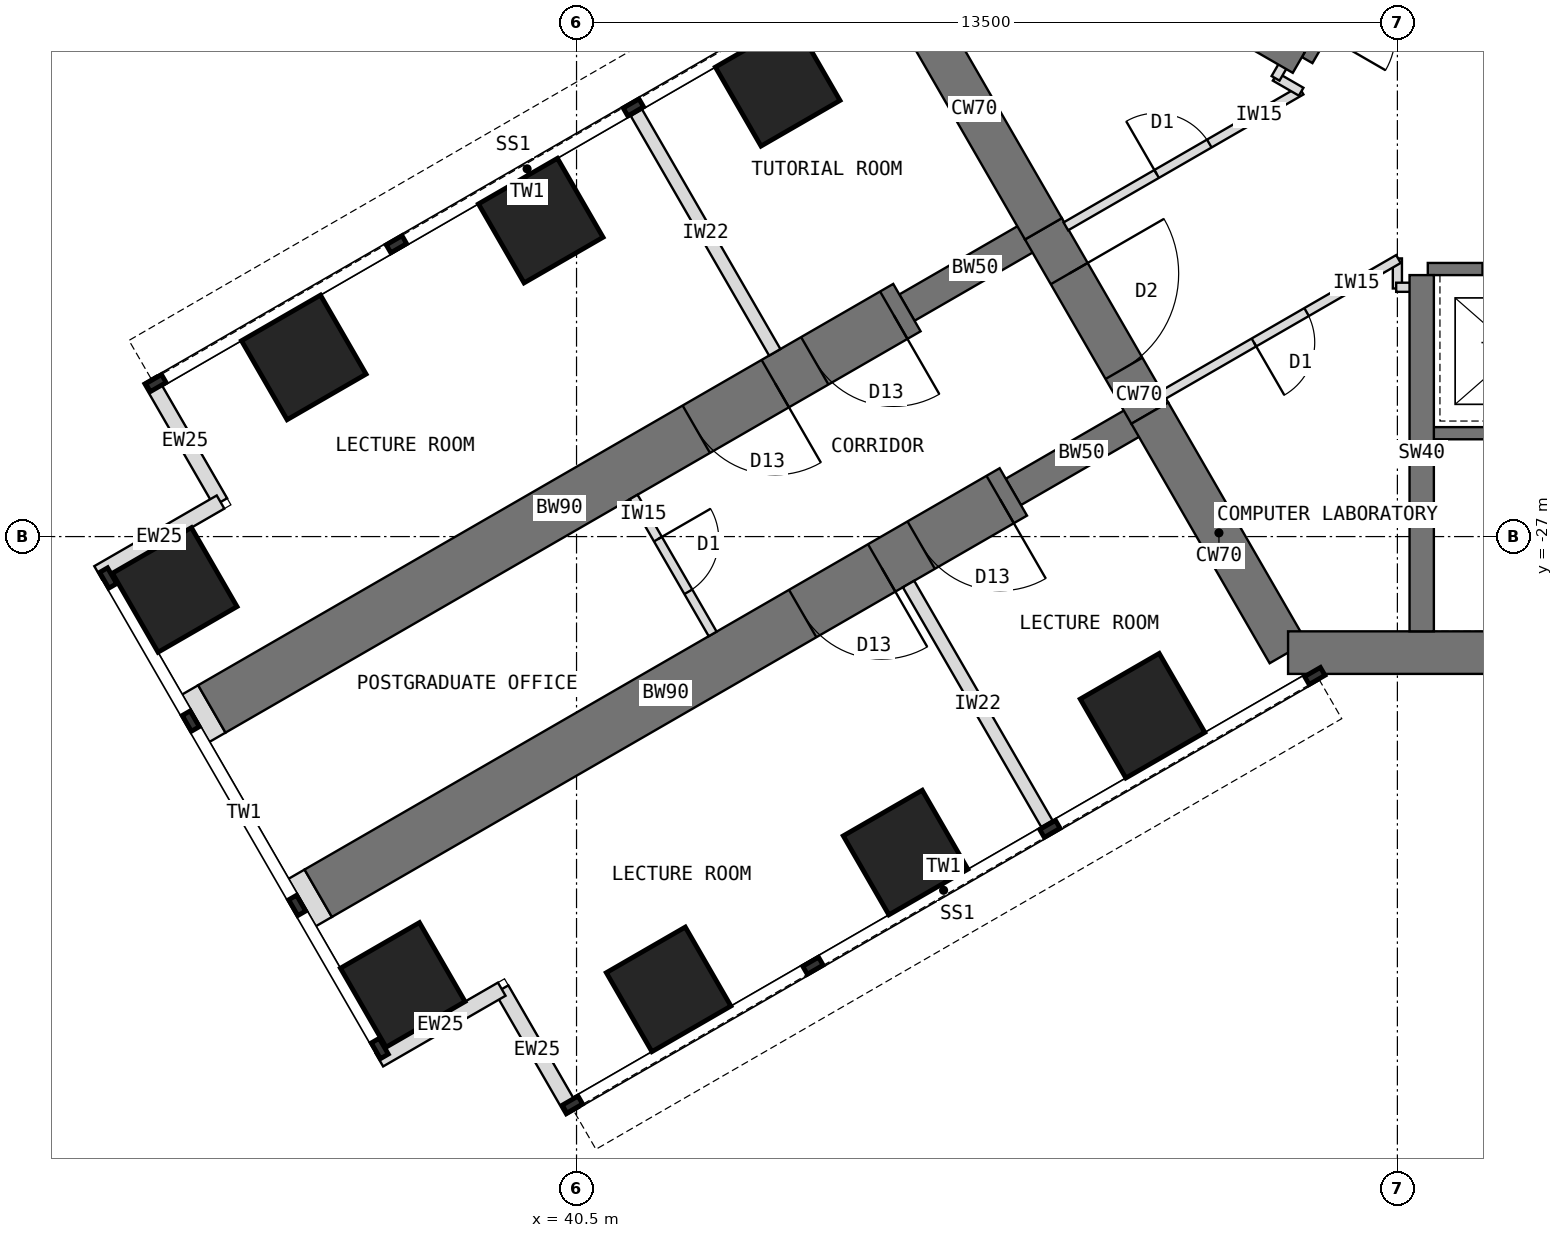
"""IFC4 building model, lengths in metres.
Left out: names, types, materials, properties, quantities, classifications, styles, units other than length and angle.
Written with IfcOpenShell. Run it as: python <this file> out.ifc"""

import sys

from ifc_helpers import new_model, si_unit, direction, frame, frame_2d, origin, origin_2d, place, context, subcontext, project, spatial, rectangle, extrude, element, fill, save


model = new_model("IFC4")
c1 = context("Model", 3, precision=1e-05, world=origin(), true_north=direction((0.0, 1.0)))
c2 = subcontext(c1, "Body", "Model", "MODEL_VIEW")
j1 = project(units=[si_unit("LENGTHUNIT", "METRE"), si_unit("PLANEANGLEUNIT", "RADIAN")], contexts=[c1])
p1 = place(None, origin())
s1 = spatial("IfcSite", under=j1, at=p1, CompositionType="ELEMENT")
p2 = place(p1, origin())
s2 = spatial("IfcBuilding", under=s1, at=p2, CompositionType="ELEMENT")
p3 = place(p2, frame((0.0, 0.0, 24.5)))
s3 = spatial("IfcBuildingStorey", under=s2, at=p3, CompositionType="ELEMENT", Elevation=24.5)
p4 = place(p3, frame((45.904, -18.0, 0.0), z_axis=(0.0, 0.0, 1.0), x_axis=(0.500024481964, -0.866011268655, 0.0)))
e1 = element("IfcWall", 1, at=p4, inside=s3, PredefinedType="SHEAR", context=c2, shape_type="SweptSolid", body=[
    extrude(rectangle(XDim=4.548, YDim=0.7, at=frame_2d((2.274, 0.0))), origin(), (0.0, 0.0, 1.0), 4.0),
])
p5 = place(p3, frame((48.178, -21.939, 0.0), z_axis=(0.0, 0.0, 1.0), x_axis=(0.500010275428, -0.866019471182, 0.0)))
e2 = element("IfcWall", 2, at=p5, inside=s3, PredefinedType="SHEAR", context=c2, shape_type="SweptSolid", body=[
    extrude(rectangle(XDim=3.5, YDim=0.7, at=frame_2d((1.75, 0.0))), origin(), (0.0, 0.0, 1.0), 4.0),
])
p6 = place(p5, frame((0.85, 0.0, 0.0)))
e3 = element("IfcOpeningElement", 3, at=p6, cuts=e2, PredefinedType="OPENING", context=c2, shape_type="SweptSolid", body=[
    extrude(rectangle(XDim=1.8, YDim=2.1, at=frame_2d((0.9, 1.05))), frame((0.0, 0.36, 0.0), z_axis=(0.0, -1.0, 0.0), x_axis=(1.0, 0.0, 0.0)), (0.0, 0.0, 1.0), 0.72),
])
p7 = place(p3, frame((49.928, -24.97, 0.0), z_axis=(0.0, 0.0, 1.0), x_axis=(0.499984222037, -0.866034513004, 0.0)))
e4 = element("IfcWall", 4, at=p7, inside=s3, PredefinedType="SHEAR", context=c2, shape_type="SweptSolid", body=[
    extrude(rectangle(XDim=4.548, YDim=0.7, at=frame_2d((2.274, 0.0))), origin(), (0.0, 0.0, 1.0), 4.0),
])
p8 = place(p3, frame((52.202, -28.908, 0.0), z_axis=(0.0, 0.0, 1.0), x_axis=(1.0, 0.0, 0.0)))
e5 = element("IfcWall", 5, at=p8, inside=s3, PredefinedType="SHEAR", context=c2, shape_type="SweptSolid", body=[
    extrude(rectangle(XDim=12.596, YDim=0.7, at=frame_2d((6.298, 0.0))), origin(), (0.0, 0.0, 1.0), 4.0),
])
p9 = place(p3, frame((49.928, -24.97, 0.0), z_axis=(0.0, 0.0, 1.0), x_axis=(-0.866031863473, -0.499988811324, 0.0)))
e6 = element("IfcWall", 6, at=p9, inside=s3, PredefinedType="SHEAR", context=c2, shape_type="SweptSolid", body=[
    extrude(rectangle(XDim=2.592, YDim=0.5, at=frame_2d((1.296, 0.0))), origin(), (0.0, 0.0, 1.0), 4.0),
])
p10 = place(p3, frame((47.684, -26.266, 0.0), z_axis=(0.0, 0.0, 1.0), x_axis=(-0.866027579429, -0.499996231654, 0.0)))
e7 = element("IfcWall", 7, at=p10, inside=s3, PredefinedType="SHEAR", context=c2, shape_type="SweptSolid", body=[
    extrude(rectangle(XDim=13.2, YDim=0.9, at=frame_2d((6.6, 0.0))), origin(), (0.0, 0.0, 1.0), 4.0),
])
p11 = place(p10, frame((0.25, 0.0, 0.0)))
e8 = element("IfcOpeningElement", 8, at=p11, cuts=e7, PredefinedType="OPENING", context=c2, shape_type="SweptSolid", body=[
    extrude(rectangle(XDim=1.5, YDim=2.1, at=frame_2d((0.75, 1.05))), frame((0.0, 0.46, 0.0), z_axis=(0.0, -1.0, 0.0), x_axis=(1.0, 0.0, 0.0)), (0.0, 0.0, 1.0), 0.92),
])
p12 = place(p10, frame((2.5, 0.0, 0.0)))
e9 = element("IfcOpeningElement", 9, at=p12, cuts=e7, PredefinedType="OPENING", context=c2, shape_type="SweptSolid", body=[
    extrude(rectangle(XDim=1.5, YDim=2.1, at=frame_2d((0.75, 1.05))), frame((0.0, 0.46, 0.0), z_axis=(0.0, -1.0, 0.0), x_axis=(1.0, 0.0, 0.0)), (0.0, 0.0, 1.0), 0.92),
])
p13 = place(p3, frame((48.178, -21.939, 0.0), z_axis=(0.0, 0.0, 1.0), x_axis=(-0.866072649678, -0.499918158782, 0.0)))
e10 = element("IfcWall", 10, at=p13, inside=s3, PredefinedType="SHEAR", context=c2, shape_type="SweptSolid", body=[
    extrude(rectangle(XDim=2.592, YDim=0.5, at=frame_2d((1.296, 0.0))), origin(), (0.0, 0.0, 1.0), 4.0),
])
p14 = place(p3, frame((45.934, -23.234, 0.0), z_axis=(0.0, 0.0, 1.0), x_axis=(-0.866019570528, -0.500010103361, 0.0)))
e11 = element("IfcWall", 11, at=p14, inside=s3, PredefinedType="SHEAR", context=c2, shape_type="SweptSolid", body=[
    extrude(rectangle(XDim=13.2, YDim=0.9, at=frame_2d((6.6, 0.0))), origin(), (0.0, 0.0, 1.0), 4.0),
])
p15 = place(p14, frame((0.25, 0.0, 0.0)))
e12 = element("IfcOpeningElement", 12, at=p15, cuts=e11, PredefinedType="OPENING", context=c2, shape_type="SweptSolid", body=[
    extrude(rectangle(XDim=1.5, YDim=2.1, at=frame_2d((0.75, 1.05))), frame((0.0, 0.46, 0.0), z_axis=(0.0, -1.0, 0.0), x_axis=(1.0, 0.0, 0.0)), (0.0, 0.0, 1.0), 0.92),
])
p16 = place(p14, frame((2.5, 0.0, 0.0)))
e13 = element("IfcOpeningElement", 13, at=p16, cuts=e11, PredefinedType="OPENING", context=c2, shape_type="SweptSolid", body=[
    extrude(rectangle(XDim=1.5, YDim=2.1, at=frame_2d((0.75, 1.05))), frame((0.0, 0.46, 0.0), z_axis=(0.0, -1.0, 0.0), x_axis=(1.0, 0.0, 0.0)), (0.0, 0.0, 1.0), 0.92),
])
for number, where, z_axis, x_axis in (
    (14, (49.809, -29.946, 0.0), (0.0, 0.0, 1.0), (0.866, 0.5, 0.0)),
    (15, (43.809, -19.554, 0.0), (0.0, 0.0, 1.0), (0.866, 0.5, 0.0)),
    (16, (45.912, -32.196, 0.0), (0.0, 0.0, 1.0), (0.866, 0.5, 0.0)),
    (17, (39.912, -21.804, 0.0), (0.0, 0.0, 1.0), (0.866, 0.5, 0.0)),
    (18, (42.014, -34.446, 0.0), (0.0, 0.0, 1.0), (0.866, 0.5, 0.0)),
    (19, (36.014, -24.054, 0.0), (0.0, 0.0, 1.0), (0.866, 0.5, 0.0)),
    (20, (37.642, -34.373, 0.0), (0.0, 0.0, 1.0), (0.866, 0.5, 0.0)),
    (21, (33.892, -27.877, 0.0), (0.0, 0.0, 1.0), (0.866, 0.5, 0.0)),
):
    element("IfcColumn", number, at=place(p3, frame(where, z_axis=z_axis, x_axis=x_axis)), inside=s3, PredefinedType="COLUMN", context=c2, shape_type="SweptSolid", body=[
        extrude(rectangle(XDim=1.5, YDim=1.5, at=origin_2d()), origin(), (0.0, 0.0, 1.0), 4.0),
    ])
for number, where, z_axis, x_axis in (
    (22, (40.433, -36.456, 0.0), (0.0, 0.0, 1.0), (-0.5, 0.866, 0.0)),
    (23, (39.27, -34.443, 0.0), (0.0, 0.0, 1.0), (-0.866, -0.5, 0.0)),
    (24, (33.483, -24.419, 0.0), (0.0, 0.0, 1.0), (0.5, -0.866, 0.0)),
    (25, (34.645, -26.432, 0.0), (0.0, 0.0, 1.0), (-0.866, -0.5, 0.0)),
):
    element("IfcWall", number, at=place(p3, frame(where, z_axis=z_axis, x_axis=x_axis)), inside=s3, PredefinedType="STANDARD", context=c2, shape_type="SweptSolid", body=[
        extrude(rectangle(XDim=2.325, YDim=0.25, at=frame_2d((1.163, 0.0))), origin(), (0.0, 0.0, 1.0), 3.8),
    ])
for number, where, z_axis, x_axis in (
    (26, (36.252, -32.865, 0.0), (0.0, 0.0, 1.0), (-0.866, -0.5, 0.0)),
    (27, (34.502, -29.834, 0.0), (0.0, 0.0, 1.0), (-0.866, -0.5, 0.0)),
):
    element("IfcWall", number, at=place(p3, frame(where, z_axis=z_axis, x_axis=x_axis)), inside=s3, PredefinedType="PARTITIONING", context=c2, shape_type="SweptSolid", body=[
        extrude(rectangle(XDim=0.31, YDim=0.9, at=frame_2d((0.155, 0.0))), origin(), (0.0, 0.0, 1.0), 3.8),
    ])
p17 = place(p3, frame((56.516, -12.236, 0.0), z_axis=(0.0, 0.0, 1.0), x_axis=(-0.49999894854, -0.866026010844, 0.0)))
e28 = element("IfcWall", 28, at=p17, inside=s3, PredefinedType="SHEAR", context=c2, shape_type="SweptSolid", body=[
    extrude(rectangle(XDim=8.0, YDim=0.2, at=frame_2d((4.0, 0.0))), origin(), (0.0, 0.0, 1.0), 4.0),
])
p18 = place(p17, frame((6.3, 0.0, 0.0)))
e29 = element("IfcOpeningElement", 29, at=p18, cuts=e28, PredefinedType="OPENING", context=c2, shape_type="SweptSolid", body=[
    extrude(rectangle(XDim=1.2, YDim=2.1, at=frame_2d((0.6, 1.05))), frame((0.0, 0.11, 0.0), z_axis=(0.0, -1.0, 0.0), x_axis=(1.0, 0.0, 0.0)), (0.0, 0.0, 1.0), 0.22),
])
p19 = place(p3, frame((52.38, -19.201, 0.0), z_axis=(0.0, 0.0, 1.0), x_axis=(-0.866023886965, 0.500002627198, 0.0)))
e30 = element("IfcWall", 30, at=p19, inside=s3, PredefinedType="SHEAR", context=c2, shape_type="SweptSolid", body=[
    extrude(rectangle(XDim=5.858, YDim=0.4, at=frame_2d((2.929, 0.0))), origin(), (0.0, 0.0, 1.0), 4.0),
])
p20 = place(p3, frame((54.5, -22.6, 0.0), z_axis=(0.0, 0.0, 1.0), x_axis=(1.0, 0.0, 0.0)))
e31 = element("IfcWall", 31, at=p20, inside=s3, PredefinedType="SHEAR", context=c2, shape_type="SweptSolid", body=[
    extrude(rectangle(XDim=8.0, YDim=0.2, at=frame_2d((4.0, 0.0))), origin(), (0.0, 0.0, 1.0), 4.0),
])
p21 = place(p20, frame((6.3, 0.0, 0.0)))
e32 = element("IfcOpeningElement", 32, at=p21, cuts=e31, PredefinedType="OPENING", context=c2, shape_type="SweptSolid", body=[
    extrude(rectangle(XDim=1.2, YDim=2.1, at=frame_2d((0.6, 1.05))), frame((0.0, 0.11, 0.0), z_axis=(0.0, -1.0, 0.0), x_axis=(1.0, 0.0, 0.0)), (0.0, 0.0, 1.0), 0.22),
])
p22 = place(p20, frame((0.9, 0.0, 0.0)))
e33 = element("IfcOpeningElement", 33, at=p22, cuts=e31, PredefinedType="OPENING", context=c2, shape_type="SweptSolid", body=[
    extrude(rectangle(XDim=1.1, YDim=2.2, at=frame_2d((0.55, 1.1))), frame((0.0, 0.11, 0.0), z_axis=(0.0, -1.0, 0.0), x_axis=(1.0, 0.0, 0.0)), (0.0, 0.0, 1.0), 0.22),
])
p23 = place(p3, frame((54.5, -25.3, 0.0), z_axis=(0.0, 0.0, 1.0), x_axis=(1.0, 0.0, 0.0)))
e34 = element("IfcWall", 34, at=p23, inside=s3, PredefinedType="SHEAR", context=c2, shape_type="SweptSolid", body=[
    extrude(rectangle(XDim=8.0, YDim=0.2, at=frame_2d((4.0, 0.0))), origin(), (0.0, 0.0, 1.0), 4.0),
])
p24 = place(p23, frame((6.7, 0.0, 0.0)))
e35 = element("IfcOpeningElement", 35, at=p24, cuts=e34, PredefinedType="OPENING", context=c2, shape_type="SweptSolid", body=[
    extrude(rectangle(XDim=1.1, YDim=2.1, at=frame_2d((0.55, 1.05))), frame((0.0, 0.11, 0.0), z_axis=(0.0, -1.0, 0.0), x_axis=(1.0, 0.0, 0.0)), (0.0, 0.0, 1.0), 0.22),
])
p25 = place(p3, frame((54.4, -22.7, 0.0), z_axis=(0.0, 0.0, 1.0), x_axis=(0.0, -1.0, 0.0)))
e36 = element("IfcWall", 36, at=p25, inside=s3, PredefinedType="SHEAR", context=c2, shape_type="SweptSolid", body=[
    extrude(rectangle(XDim=5.858, YDim=0.4, at=frame_2d((2.929, 0.0))), origin(), (0.0, 0.0, 1.0), 4.0),
])
for number, where, z_axis, x_axis in (
    (37, (45.96, -27.78, 0.0), (0.0, 0.0, 1.0), (0.5, -0.866, 0.0)),
    (38, (43.76, -23.97, 0.0), (0.0, 0.0, 1.0), (-0.5, 0.866, 0.0)),
):
    element("IfcWall", number, at=place(p3, frame(where, z_axis=z_axis, x_axis=x_axis)), inside=s3, PredefinedType="PARTITIONING", context=c2, shape_type="SweptSolid", body=[
        extrude(rectangle(XDim=4.55, YDim=0.215, at=frame_2d((2.275, 0.0))), origin(), (0.0, 0.0, 1.0), 3.8),
    ])
p26 = place(p3, frame((54.0, -22.92, 0.0), z_axis=(0.0, 0.0, 1.0), x_axis=(0.0, 1.0, 0.0)))
e39 = element("IfcWall", 39, at=p26, inside=s3, PredefinedType="PARTITIONING", context=c2, shape_type="SweptSolid", body=[
    extrude(rectangle(XDim=0.494, YDim=0.15, at=frame_2d((0.247, 0.0))), origin(), (0.0, 0.0, 1.0), 3.8),
])
p27 = place(p3, frame((54.017, -22.436, 0.0), z_axis=(0.0, 0.0, 1.0), x_axis=(-0.866015446554, -0.500017246033, 0.0)))
e40 = element("IfcWall", 40, at=p27, inside=s3, PredefinedType="PARTITIONING", context=c2, shape_type="SweptSolid", body=[
    extrude(rectangle(XDim=4.469, YDim=0.15, at=frame_2d((2.234, 0.0))), origin(), (0.0, 0.0, 1.0), 3.8),
])
p28 = place(p27, frame((1.744, 0.0, 0.0)))
e41 = element("IfcOpeningElement", 41, at=p28, cuts=e40, PredefinedType="OPENING", context=c2, shape_type="SweptSolid", body=[
    extrude(rectangle(XDim=1.0, YDim=2.1, at=frame_2d((0.5, 1.05))), frame((0.0, 0.085, 0.0), z_axis=(0.0, -1.0, 0.0), x_axis=(1.0, 0.0, 0.0)), (0.0, 0.0, 1.0), 0.17),
])
p29 = place(p3, frame((48.548, -21.898, 0.0), z_axis=(0.0, 0.0, 1.0), x_axis=(0.866025445582, 0.499999927604, 0.0)))
e42 = element("IfcWall", 42, at=p29, inside=s3, PredefinedType="PARTITIONING", context=c2, shape_type="SweptSolid", body=[
    extrude(rectangle(XDim=4.468, YDim=0.15, at=frame_2d((2.234, 0.0))), origin(), (0.0, 0.0, 1.0), 3.8),
])
p30 = place(p29, frame((1.724, 0.0, 0.0)))
e43 = element("IfcOpeningElement", 43, at=p30, cuts=e42, PredefinedType="OPENING", context=c2, shape_type="SweptSolid", body=[
    extrude(rectangle(XDim=1.0, YDim=2.1, at=frame_2d((0.5, 1.05))), frame((0.0, 0.085, 0.0), z_axis=(0.0, -1.0, 0.0), x_axis=(1.0, 0.0, 0.0)), (0.0, 0.0, 1.0), 0.17),
])
p31 = place(p3, frame((52.417, -19.684, 0.0), z_axis=(0.0, 0.0, 1.0), x_axis=(-0.865831790172, 0.50033519877, 0.0)))
e44 = element("IfcWall", 44, at=p31, inside=s3, PredefinedType="PARTITIONING", context=c2, shape_type="SweptSolid", body=[
    extrude(rectangle(XDim=0.494, YDim=0.15, at=frame_2d((0.247, 0.0))), origin(), (0.0, 0.0, 1.0), 3.8),
])
for number, where, z_axis, x_axis in (
    (45, (51.997, -19.464, 0.0), (0.0, 0.0, 1.0), (0.5, 0.866, 0.0)),
    (46, (54.41, -22.9, 0.0), (0.0, 0.0, 1.0), (-1.0, 0.0, 0.0)),
):
    element("IfcWall", number, at=place(p3, frame(where, z_axis=z_axis, x_axis=x_axis)), inside=s3, PredefinedType="PARTITIONING", context=c2, shape_type="SweptSolid", body=[
        extrude(rectangle(XDim=0.43, YDim=0.15, at=frame_2d((0.215, 0.0))), origin(), (0.0, 0.0, 1.0), 3.8),
    ])
p32 = place(p3, frame((41.439, -26.349, 0.0), z_axis=(0.0, 0.0, 1.0), x_axis=(0.500006934395, -0.866021400173, 0.0)))
e47 = element("IfcWall", 47, at=p32, inside=s3, PredefinedType="PARTITIONING", context=c2, shape_type="SweptSolid", body=[
    extrude(rectangle(XDim=2.6, YDim=0.15, at=frame_2d((1.3, 0.0))), origin(), (0.0, 0.0, 1.0), 3.8),
])
p33 = place(p32, frame((0.8, 0.0, 0.0)))
e48 = element("IfcOpeningElement", 48, at=p33, cuts=e47, PredefinedType="OPENING", context=c2, shape_type="SweptSolid", body=[
    extrude(rectangle(XDim=1.0, YDim=2.1, at=frame_2d((0.5, 1.05))), frame((0.0, 0.085, 0.0), z_axis=(0.0, -1.0, 0.0), x_axis=(1.0, 0.0, 0.0)), (0.0, 0.0, 1.0), 0.17),
])
p34 = place(p6, origin())
e49 = element("IfcDoor", 49, at=p34, inside=s3, OperationType="DOUBLE_DOOR_DOUBLE_SWING", PredefinedType="DOOR", context=c2, shape_type="SweptSolid", body=[
    extrude(rectangle(XDim=1.72, YDim=2.06, at=frame_2d((0.9, 1.03))), frame((0.0, 0.025, 0.0), z_axis=(0.0, -1.0, 0.0), x_axis=(1.0, 0.0, 0.0)), (0.0, 0.0, 1.0), 0.05),
    extrude(rectangle(XDim=0.04, YDim=2.1, at=frame_2d((0.02, 1.05))), frame((0.0, 0.35, 0.0), z_axis=(0.0, -1.0, 0.0), x_axis=(1.0, 0.0, 0.0)), (0.0, 0.0, 1.0), 0.699),
    extrude(rectangle(XDim=0.04, YDim=2.1, at=frame_2d((1.78, 1.05))), frame((0.0, 0.35, 0.0), z_axis=(0.0, -1.0, 0.0), x_axis=(1.0, 0.0, 0.0)), (0.0, 0.0, 1.0), 0.699),
    extrude(rectangle(XDim=1.72, YDim=0.04, at=frame_2d((0.9, 2.08))), frame((0.0, 0.35, 0.0), z_axis=(0.0, -1.0, 0.0), x_axis=(1.0, 0.0, 0.0)), (0.0, 0.0, 1.0), 0.699),
])
fill(e3, e49)
p35 = place(p30, origin())
e50 = element("IfcDoor", 50, at=p35, inside=s3, OperationType="SINGLE_SWING_LEFT", PredefinedType="DOOR", context=c2, shape_type="SweptSolid", body=[
    extrude(rectangle(XDim=1.0, YDim=2.1, at=frame_2d((0.5, 1.05))), frame((0.0, 0.025, 0.0), z_axis=(0.0, -1.0, 0.0), x_axis=(1.0, 0.0, 0.0)), (0.0, 0.0, 1.0), 0.05),
])
fill(e43, e50)
p36 = place(p28, origin())
e51 = element("IfcDoor", 51, at=p36, inside=s3, OperationType="SINGLE_SWING_RIGHT", PredefinedType="DOOR", context=c2, shape_type="SweptSolid", body=[
    extrude(rectangle(XDim=1.0, YDim=2.1, at=frame_2d((0.5, 1.05))), frame((0.0, 0.025, 0.0), z_axis=(0.0, -1.0, 0.0), x_axis=(1.0, 0.0, 0.0)), (0.0, 0.0, 1.0), 0.05),
])
fill(e41, e51)
p37 = place(p33, origin())
e52 = element("IfcDoor", 52, at=p37, inside=s3, OperationType="SINGLE_SWING_LEFT", PredefinedType="DOOR", context=c2, shape_type="SweptSolid", body=[
    extrude(rectangle(XDim=1.0, YDim=2.1, at=frame_2d((0.5, 1.05))), frame((0.0, 0.025, 0.0), z_axis=(0.0, -1.0, 0.0), x_axis=(1.0, 0.0, 0.0)), (0.0, 0.0, 1.0), 0.05),
])
fill(e48, e52)
p38 = place(p11, origin())
e53 = element("IfcDoor", 53, at=p38, inside=s3, OperationType="DOUBLE_DOOR_SINGLE_SWING", PredefinedType="DOOR", context=c2, shape_type="SweptSolid", body=[
    extrude(rectangle(XDim=1.42, YDim=2.06, at=frame_2d((0.75, 1.03))), frame((0.0, 0.025, 0.0), z_axis=(0.0, -1.0, 0.0), x_axis=(1.0, 0.0, 0.0)), (0.0, 0.0, 1.0), 0.05),
    extrude(rectangle(XDim=0.04, YDim=2.1, at=frame_2d((0.02, 1.05))), frame((0.0, 0.45, 0.0), z_axis=(0.0, -1.0, 0.0), x_axis=(1.0, 0.0, 0.0)), (0.0, 0.0, 1.0), 0.899),
    extrude(rectangle(XDim=0.04, YDim=2.1, at=frame_2d((1.48, 1.05))), frame((0.0, 0.45, 0.0), z_axis=(0.0, -1.0, 0.0), x_axis=(1.0, 0.0, 0.0)), (0.0, 0.0, 1.0), 0.899),
    extrude(rectangle(XDim=1.42, YDim=0.04, at=frame_2d((0.75, 2.08))), frame((0.0, 0.45, 0.0), z_axis=(0.0, -1.0, 0.0), x_axis=(1.0, 0.0, 0.0)), (0.0, 0.0, 1.0), 0.899),
])
fill(e8, e53)
p39 = place(p12, origin())
e54 = element("IfcDoor", 54, at=p39, inside=s3, OperationType="DOUBLE_DOOR_SINGLE_SWING", PredefinedType="DOOR", context=c2, shape_type="SweptSolid", body=[
    extrude(rectangle(XDim=1.42, YDim=2.06, at=frame_2d((0.75, 1.03))), frame((0.0, 0.025, 0.0), z_axis=(0.0, -1.0, 0.0), x_axis=(1.0, 0.0, 0.0)), (0.0, 0.0, 1.0), 0.05),
    extrude(rectangle(XDim=0.04, YDim=2.1, at=frame_2d((0.02, 1.05))), frame((0.0, 0.45, 0.0), z_axis=(0.0, -1.0, 0.0), x_axis=(1.0, 0.0, 0.0)), (0.0, 0.0, 1.0), 0.899),
    extrude(rectangle(XDim=0.04, YDim=2.1, at=frame_2d((1.48, 1.05))), frame((0.0, 0.45, 0.0), z_axis=(0.0, -1.0, 0.0), x_axis=(1.0, 0.0, 0.0)), (0.0, 0.0, 1.0), 0.899),
    extrude(rectangle(XDim=1.42, YDim=0.04, at=frame_2d((0.75, 2.08))), frame((0.0, 0.45, 0.0), z_axis=(0.0, -1.0, 0.0), x_axis=(1.0, 0.0, 0.0)), (0.0, 0.0, 1.0), 0.899),
])
fill(e9, e54)
p40 = place(p15, origin())
e55 = element("IfcDoor", 55, at=p40, inside=s3, OperationType="DOUBLE_DOOR_SINGLE_SWING", PredefinedType="DOOR", context=c2, shape_type="SweptSolid", body=[
    extrude(rectangle(XDim=1.42, YDim=2.06, at=frame_2d((0.75, 1.03))), frame((0.0, 0.025, 0.0), z_axis=(0.0, -1.0, 0.0), x_axis=(1.0, 0.0, 0.0)), (0.0, 0.0, 1.0), 0.05),
    extrude(rectangle(XDim=0.04, YDim=2.1, at=frame_2d((0.02, 1.05))), frame((0.0, 0.45, 0.0), z_axis=(0.0, -1.0, 0.0), x_axis=(1.0, 0.0, 0.0)), (0.0, 0.0, 1.0), 0.899),
    extrude(rectangle(XDim=0.04, YDim=2.1, at=frame_2d((1.48, 1.05))), frame((0.0, 0.45, 0.0), z_axis=(0.0, -1.0, 0.0), x_axis=(1.0, 0.0, 0.0)), (0.0, 0.0, 1.0), 0.899),
    extrude(rectangle(XDim=1.42, YDim=0.04, at=frame_2d((0.75, 2.08))), frame((0.0, 0.45, 0.0), z_axis=(0.0, -1.0, 0.0), x_axis=(1.0, 0.0, 0.0)), (0.0, 0.0, 1.0), 0.899),
])
fill(e12, e55)
p41 = place(p16, origin())
e56 = element("IfcDoor", 56, at=p41, inside=s3, OperationType="DOUBLE_DOOR_SINGLE_SWING", PredefinedType="DOOR", context=c2, shape_type="SweptSolid", body=[
    extrude(rectangle(XDim=1.42, YDim=2.06, at=frame_2d((0.75, 1.03))), frame((0.0, 0.025, 0.0), z_axis=(0.0, -1.0, 0.0), x_axis=(1.0, 0.0, 0.0)), (0.0, 0.0, 1.0), 0.05),
    extrude(rectangle(XDim=0.04, YDim=2.1, at=frame_2d((0.02, 1.05))), frame((0.0, 0.45, 0.0), z_axis=(0.0, -1.0, 0.0), x_axis=(1.0, 0.0, 0.0)), (0.0, 0.0, 1.0), 0.899),
    extrude(rectangle(XDim=0.04, YDim=2.1, at=frame_2d((1.48, 1.05))), frame((0.0, 0.45, 0.0), z_axis=(0.0, -1.0, 0.0), x_axis=(1.0, 0.0, 0.0)), (0.0, 0.0, 1.0), 0.899),
    extrude(rectangle(XDim=1.42, YDim=0.04, at=frame_2d((0.75, 2.08))), frame((0.0, 0.45, 0.0), z_axis=(0.0, -1.0, 0.0), x_axis=(1.0, 0.0, 0.0)), (0.0, 0.0, 1.0), 0.899),
])
fill(e13, e56)
save(model, sys.argv[1])
